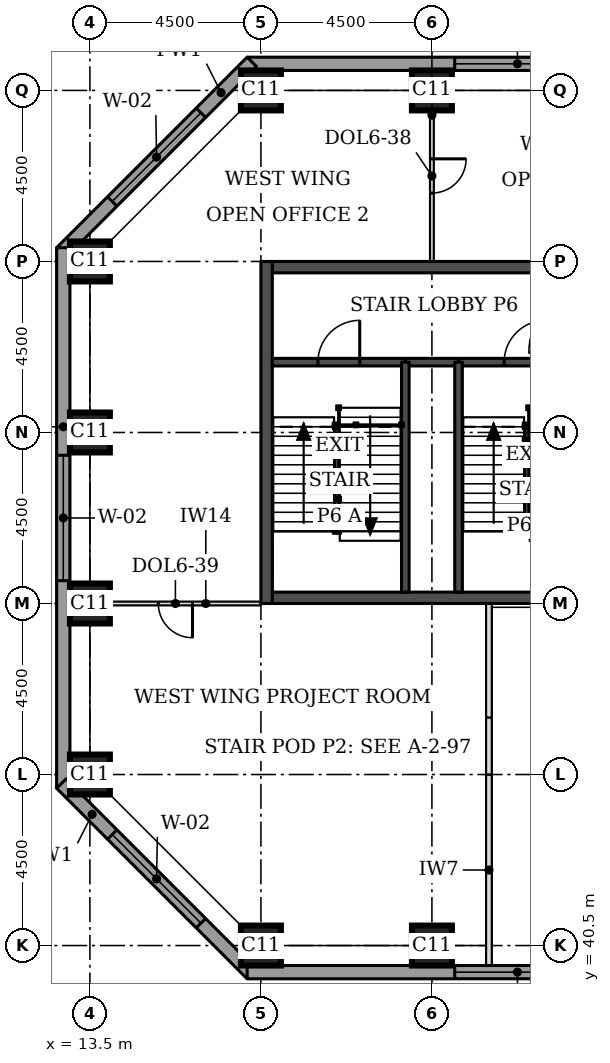
"""IFC4 building model, lengths in metres.
Left out: names, types, materials, properties, quantities, classifications, styles, units other than length and angle.
Written with IfcOpenShell. Run it as: python <this file> out.ifc"""

import sys

from ifc_helpers import new_model, si_unit, direction, frame, frame_2d, origin, origin_2d, place, context, subcontext, project, spatial, rectangle, extrude, element, fill, save


model = new_model("IFC4")
c1 = context("Model", 3, precision=1e-05, world=origin(), true_north=direction((0.0, 1.0)))
c2 = subcontext(c1, "Body", "Model", "MODEL_VIEW")
j1 = project(units=[si_unit("LENGTHUNIT", "METRE"), si_unit("PLANEANGLEUNIT", "RADIAN")], contexts=[c1])
p1 = place(None, origin())
s1 = spatial("IfcSite", under=j1, at=p1, CompositionType="ELEMENT")
p2 = place(p1, origin())
s2 = spatial("IfcBuilding", under=s1, at=p2, CompositionType="ELEMENT")
p3 = place(p2, frame((0.0, 0.0, 119.6)))
s3 = spatial("IfcBuildingStorey", under=s2, at=p3, CompositionType="ELEMENT", Elevation=119.6)
for number, where, z_axis, x_axis in (
    (1, (18.0, 40.5, 0.0), (0.0, 0.0, 1.0), (1.0, 0.0, 0.0)),
    (2, (22.5, 40.5, 0.0), (0.0, 0.0, 1.0), (1.0, 0.0, 0.0)),
    (3, (13.5, 45.0, 0.0), (0.0, 0.0, 1.0), (1.0, 0.0, 0.0)),
    (4, (13.5, 49.5, 0.0), (0.0, 0.0, 1.0), (1.0, 0.0, 0.0)),
    (5, (13.5, 54.0, 0.0), (0.0, 0.0, 1.0), (1.0, 0.0, 0.0)),
    (6, (13.5, 58.5, 0.0), (0.0, 0.0, 1.0), (1.0, 0.0, 0.0)),
    (7, (18.0, 63.0, 0.0), (0.0, 0.0, 1.0), (1.0, 0.0, 0.0)),
    (8, (22.5, 63.0, 0.0), (0.0, 0.0, 1.0), (1.0, 0.0, 0.0)),
):
    element("IfcColumn", number, at=place(p3, frame(where, z_axis=z_axis, x_axis=x_axis)), inside=s3, PredefinedType="COLUMN", context=c2, shape_type="SweptSolid", body=[
        extrude(rectangle(XDim=1.05, YDim=1.05, at=origin_2d()), origin(), (0.0, 0.0, 1.0), 3.7),
    ])
for number, where, z_axis, x_axis in (
    (9, (18.3, 49.65, 0.0), (0.0, 0.0, 1.0), (1.0, 0.0, 0.0)),
    (10, (18.3, 58.35, 0.0), (0.0, 0.0, 1.0), (1.0, 0.0, 0.0)),
):
    element("IfcWall", number, at=place(p3, frame(where, z_axis=z_axis, x_axis=x_axis)), inside=s3, PredefinedType="SHEAR", context=c2, shape_type="SweptSolid", body=[
        extrude(rectangle(XDim=8.4, YDim=0.3, at=frame_2d((4.2, 0.0))), origin(), (0.0, 0.0, 1.0), 3.7),
    ])
p4 = place(p3, frame((18.15, 49.5, 0.0), z_axis=(0.0, 0.0, 1.0), x_axis=(0.0, 1.0, 0.0)))
e11 = element("IfcWall", 11, at=p4, inside=s3, PredefinedType="SHEAR", context=c2, shape_type="SweptSolid", body=[
    extrude(rectangle(XDim=9.0, YDim=0.3, at=frame_2d((4.5, 0.0))), origin(), (0.0, 0.0, 1.0), 3.7),
])
p5 = place(p3, frame((35.475, 63.7, 0.0), z_axis=(0.0, 0.0, 1.0), x_axis=(-1.0, 0.0, 0.0)))
e12 = element("IfcWall", 12, at=p5, inside=s3, PredefinedType="STANDARD", context=c2, shape_type="SweptSolid", body=[
    extrude(rectangle(XDim=17.837, YDim=0.35, at=frame_2d((8.919, 0.0))), origin(), (0.0, 0.0, 1.0), 3.525),
])
p6 = place(p5, frame((0.5, 0.0, 0.9)))
e13 = element("IfcOpeningElement", 13, at=p6, cuts=e12, PredefinedType="OPENING", context=c2, shape_type="SweptSolid", body=[
    extrude(rectangle(XDim=3.3, YDim=1.9, at=frame_2d((1.65, 0.95))), frame((0.0, 0.185, 0.0), z_axis=(0.0, -1.0, 0.0), x_axis=(1.0, 0.0, 0.0)), (0.0, 0.0, 1.0), 0.37),
])
p7 = place(p5, frame((9.075, 0.0, 0.9)))
e14 = element("IfcOpeningElement", 14, at=p7, cuts=e12, PredefinedType="OPENING", context=c2, shape_type="SweptSolid", body=[
    extrude(rectangle(XDim=3.3, YDim=1.9, at=frame_2d((1.65, 0.95))), frame((0.0, 0.185, 0.0), z_axis=(0.0, -1.0, 0.0), x_axis=(1.0, 0.0, 0.0)), (0.0, 0.0, 1.0), 0.37),
])
p8 = place(p3, frame((17.761, 63.751, 0.0), z_axis=(0.0, 0.0, 1.0), x_axis=(-0.707106781187, -0.707106781187, 0.0)))
e15 = element("IfcWall", 15, at=p8, inside=s3, PredefinedType="STANDARD", context=c2, shape_type="SweptSolid", body=[
    extrude(rectangle(XDim=7.089, YDim=0.35, at=frame_2d((3.544, 0.0))), origin(), (0.0, 0.0, 1.0), 3.525),
])
p9 = place(p8, frame((1.894, 0.0, 0.9)))
e16 = element("IfcOpeningElement", 16, at=p9, cuts=e15, PredefinedType="OPENING", context=c2, shape_type="SweptSolid", body=[
    extrude(rectangle(XDim=3.3, YDim=1.9, at=frame_2d((1.65, 0.95))), frame((0.0, 0.185, 0.0), z_axis=(0.0, -1.0, 0.0), x_axis=(1.0, 0.0, 0.0)), (0.0, 0.0, 1.0), 0.37),
])
p10 = place(p3, frame((12.8, 58.862, 0.0), z_axis=(0.0, 0.0, 1.0), x_axis=(0.0, -1.0, 0.0)))
e17 = element("IfcWall", 17, at=p10, inside=s3, PredefinedType="STANDARD", context=c2, shape_type="SweptSolid", body=[
    extrude(rectangle(XDim=14.225, YDim=0.35, at=frame_2d((7.112, 0.0))), origin(), (0.0, 0.0, 1.0), 3.525),
])
p11 = place(p10, frame((5.462, 0.0, 0.9)))
e18 = element("IfcOpeningElement", 18, at=p11, cuts=e17, PredefinedType="OPENING", context=c2, shape_type="SweptSolid", body=[
    extrude(rectangle(XDim=3.3, YDim=1.9, at=frame_2d((1.65, 0.95))), frame((0.0, 0.185, 0.0), z_axis=(0.0, -1.0, 0.0), x_axis=(1.0, 0.0, 0.0)), (0.0, 0.0, 1.0), 0.37),
])
p12 = place(p3, frame((12.749, 44.761, 0.0), z_axis=(0.0, 0.0, 1.0), x_axis=(0.707106781187, -0.707106781187, 0.0)))
e19 = element("IfcWall", 19, at=p12, inside=s3, PredefinedType="STANDARD", context=c2, shape_type="SweptSolid", body=[
    extrude(rectangle(XDim=7.089, YDim=0.35, at=frame_2d((3.544, 0.0))), origin(), (0.0, 0.0, 1.0), 3.525),
])
p13 = place(p12, frame((1.894, 0.0, 0.9)))
e20 = element("IfcOpeningElement", 20, at=p13, cuts=e19, PredefinedType="OPENING", context=c2, shape_type="SweptSolid", body=[
    extrude(rectangle(XDim=3.3, YDim=1.9, at=frame_2d((1.65, 0.95))), frame((0.0, 0.185, 0.0), z_axis=(0.0, -1.0, 0.0), x_axis=(1.0, 0.0, 0.0)), (0.0, 0.0, 1.0), 0.37),
])
p14 = place(p3, frame((17.638, 39.8, 0.0), z_axis=(0.0, 0.0, 1.0), x_axis=(1.0, 0.0, 0.0)))
e21 = element("IfcWall", 21, at=p14, inside=s3, PredefinedType="STANDARD", context=c2, shape_type="SweptSolid", body=[
    extrude(rectangle(XDim=17.837, YDim=0.35, at=frame_2d((8.919, 0.0))), origin(), (0.0, 0.0, 1.0), 3.525),
])
p15 = place(p14, frame((5.462, 0.0, 0.9)))
e22 = element("IfcOpeningElement", 22, at=p15, cuts=e21, PredefinedType="OPENING", context=c2, shape_type="SweptSolid", body=[
    extrude(rectangle(XDim=3.3, YDim=1.9, at=frame_2d((1.65, 0.95))), frame((0.0, 0.185, 0.0), z_axis=(0.0, -1.0, 0.0), x_axis=(1.0, 0.0, 0.0)), (0.0, 0.0, 1.0), 0.37),
])
p16 = place(p14, frame((14.037, 0.0, 0.9)))
e23 = element("IfcOpeningElement", 23, at=p16, cuts=e21, PredefinedType="OPENING", context=c2, shape_type="SweptSolid", body=[
    extrude(rectangle(XDim=3.3, YDim=1.9, at=frame_2d((1.65, 0.95))), frame((0.0, 0.185, 0.0), z_axis=(0.0, -1.0, 0.0), x_axis=(1.0, 0.0, 0.0)), (0.0, 0.0, 1.0), 0.37),
])
p17 = place(p3, frame((24.0, 39.975, 0.0), z_axis=(0.0, 0.0, 1.0), x_axis=(0.0, 1.0, 0.0)))
e24 = element("IfcWall", 24, at=p17, inside=s3, PredefinedType="PARTITIONING", context=c2, shape_type="SweptSolid", body=[
    extrude(rectangle(XDim=5.025, YDim=0.15, at=frame_2d((2.512, 0.0))), origin(), (0.0, 0.0, 1.0), 3.55),
])
p18 = place(p3, frame((24.0, 45.0, 0.0), z_axis=(0.0, 0.0, 1.0), x_axis=(0.0, 1.0, 0.0)))
e25 = element("IfcWall", 25, at=p18, inside=s3, PredefinedType="PARTITIONING", context=c2, shape_type="SweptSolid", body=[
    extrude(rectangle(XDim=1.5, YDim=0.15, at=frame_2d((0.75, 0.0))), origin(), (0.0, 0.0, 1.0), 3.55),
])
p19 = place(p3, frame((24.0, 46.5, 0.0), z_axis=(0.0, 0.0, 1.0), x_axis=(0.0, 1.0, 0.0)))
e26 = element("IfcWall", 26, at=p19, inside=s3, PredefinedType="PARTITIONING", context=c2, shape_type="SweptSolid", body=[
    extrude(rectangle(XDim=3.0, YDim=0.15, at=frame_2d((1.5, 0.0))), origin(), (0.0, 0.0, 1.0), 3.55),
])
p20 = place(p3, frame((22.5, 63.0, 0.0), z_axis=(0.0, 0.0, 1.0), x_axis=(0.0, -1.0, 0.0)))
e27 = element("IfcWall", 27, at=p20, inside=s3, PredefinedType="PARTITIONING", context=c2, shape_type="SweptSolid", body=[
    extrude(rectangle(XDim=4.5, YDim=0.1, at=frame_2d((2.25, 0.0))), origin(), (0.0, 0.0, 1.0), 3.55),
])
p21 = place(p20, frame((1.8, 0.0, 0.0)))
e28 = element("IfcOpeningElement", 28, at=p21, cuts=e27, PredefinedType="OPENING", context=c2, shape_type="SweptSolid", body=[
    extrude(rectangle(XDim=0.9, YDim=2.1, at=frame_2d((0.45, 1.05))), frame((0.0, 0.06, 0.0), z_axis=(0.0, -1.0, 0.0), x_axis=(1.0, 0.0, 0.0)), (0.0, 0.0, 1.0), 0.12),
])
p22 = place(p3, frame((13.5, 49.5, 0.0), z_axis=(0.0, 0.0, 1.0), x_axis=(1.0, 0.0, 0.0)))
e29 = element("IfcWall", 29, at=p22, inside=s3, PredefinedType="PARTITIONING", context=c2, shape_type="SweptSolid", body=[
    extrude(rectangle(XDim=4.5, YDim=0.1, at=frame_2d((2.25, 0.0))), origin(), (0.0, 0.0, 1.0), 3.55),
])
p23 = place(p22, frame((1.8, 0.0, 0.0)))
e30 = element("IfcOpeningElement", 30, at=p23, cuts=e29, PredefinedType="OPENING", context=c2, shape_type="SweptSolid", body=[
    extrude(rectangle(XDim=0.9, YDim=2.1, at=frame_2d((0.45, 1.05))), frame((0.0, 0.06, 0.0), z_axis=(0.0, -1.0, 0.0), x_axis=(1.0, 0.0, 0.0)), (0.0, 0.0, 1.0), 0.12),
])
p24 = place(p3, frame((21.8, 55.85, 0.0), z_axis=(0.0, 0.0, 1.0), x_axis=(1.0, 0.0, 0.0)))
e31 = element("IfcWall", 31, at=p24, inside=s3, PredefinedType="SOLIDWALL", context=c2, shape_type="SweptSolid", body=[
    extrude(rectangle(XDim=1.4, YDim=0.2, at=frame_2d((0.7, 0.0))), origin(), (0.0, 0.0, 1.0), 3.55),
])
p25 = place(p3, frame((18.3, 55.85, 0.0), z_axis=(0.0, 0.0, 1.0), x_axis=(1.0, 0.0, 0.0)))
e32 = element("IfcWall", 32, at=p25, inside=s3, PredefinedType="SOLIDWALL", context=c2, shape_type="SweptSolid", body=[
    extrude(rectangle(XDim=3.5, YDim=0.2, at=frame_2d((1.75, 0.0))), origin(), (0.0, 0.0, 1.0), 3.55),
])
p26 = place(p25, frame((1.2, 0.0, 0.0)))
e33 = element("IfcOpeningElement", 33, at=p26, cuts=e32, PredefinedType="OPENING", context=c2, shape_type="SweptSolid", body=[
    extrude(rectangle(XDim=1.1, YDim=2.1, at=frame_2d((0.55, 1.05))), frame((0.0, 0.11, 0.0), z_axis=(0.0, -1.0, 0.0), x_axis=(1.0, 0.0, 0.0)), (0.0, 0.0, 1.0), 0.22),
])
p27 = place(p3, frame((23.2, 55.85, 0.0), z_axis=(0.0, 0.0, 1.0), x_axis=(1.0, 0.0, 0.0)))
e34 = element("IfcWall", 34, at=p27, inside=s3, PredefinedType="SOLIDWALL", context=c2, shape_type="SweptSolid", body=[
    extrude(rectangle(XDim=3.5, YDim=0.2, at=frame_2d((1.75, 0.0))), origin(), (0.0, 0.0, 1.0), 3.55),
])
p28 = place(p27, frame((1.2, 0.0, 0.0)))
e35 = element("IfcOpeningElement", 35, at=p28, cuts=e34, PredefinedType="OPENING", context=c2, shape_type="SweptSolid", body=[
    extrude(rectangle(XDim=1.1, YDim=2.1, at=frame_2d((0.55, 1.05))), frame((0.0, 0.11, 0.0), z_axis=(0.0, -1.0, 0.0), x_axis=(1.0, 0.0, 0.0)), (0.0, 0.0, 1.0), 0.22),
])
for number, where, z_axis, x_axis in (
    (36, (21.8, 49.8, 0.0), (0.0, 0.0, 1.0), (0.0, 1.0, 0.0)),
    (37, (23.2, 49.8, 0.0), (0.0, 0.0, 1.0), (0.0, 1.0, 0.0)),
):
    element("IfcWall", number, at=place(p3, frame(where, z_axis=z_axis, x_axis=x_axis)), inside=s3, PredefinedType="SOLIDWALL", context=c2, shape_type="SweptSolid", body=[
        extrude(rectangle(XDim=6.05, YDim=0.2, at=frame_2d((3.025, 0.0))), origin(), (0.0, 0.0, 1.0), 3.55),
    ])
p29 = place(p7, origin())
e38 = element("IfcWindow", 38, at=p29, inside=s3, PartitioningType="SINGLE_PANEL", PredefinedType="WINDOW", context=c2, shape_type="SweptSolid", body=[
    extrude(rectangle(XDim=3.3, YDim=1.9, at=frame_2d((1.65, 0.95))), frame((0.0, 0.085, 0.0), z_axis=(0.0, -1.0, 0.0), x_axis=(1.0, 0.0, 0.0)), (0.0, 0.0, 1.0), 0.06),
])
fill(e14, e38)
p30 = place(p9, origin())
e39 = element("IfcWindow", 39, at=p30, inside=s3, PartitioningType="SINGLE_PANEL", PredefinedType="WINDOW", context=c2, shape_type="SweptSolid", body=[
    extrude(rectangle(XDim=3.3, YDim=1.9, at=frame_2d((1.65, 0.95))), frame((0.0, 0.085, 0.0), z_axis=(0.0, -1.0, 0.0), x_axis=(1.0, 0.0, 0.0)), (0.0, 0.0, 1.0), 0.06),
])
fill(e16, e39)
p31 = place(p11, origin())
e40 = element("IfcWindow", 40, at=p31, inside=s3, PartitioningType="SINGLE_PANEL", PredefinedType="WINDOW", context=c2, shape_type="SweptSolid", body=[
    extrude(rectangle(XDim=3.3, YDim=1.9, at=frame_2d((1.65, 0.95))), frame((0.0, 0.085, 0.0), z_axis=(0.0, -1.0, 0.0), x_axis=(1.0, 0.0, 0.0)), (0.0, 0.0, 1.0), 0.06),
])
fill(e18, e40)
p32 = place(p13, origin())
e41 = element("IfcWindow", 41, at=p32, inside=s3, PartitioningType="SINGLE_PANEL", PredefinedType="WINDOW", context=c2, shape_type="SweptSolid", body=[
    extrude(rectangle(XDim=3.3, YDim=1.9, at=frame_2d((1.65, 0.95))), frame((0.0, 0.085, 0.0), z_axis=(0.0, -1.0, 0.0), x_axis=(1.0, 0.0, 0.0)), (0.0, 0.0, 1.0), 0.06),
])
fill(e20, e41)
p33 = place(p15, origin())
e42 = element("IfcWindow", 42, at=p33, inside=s3, PartitioningType="SINGLE_PANEL", PredefinedType="WINDOW", context=c2, shape_type="SweptSolid", body=[
    extrude(rectangle(XDim=3.3, YDim=1.9, at=frame_2d((1.65, 0.95))), frame((0.0, 0.085, 0.0), z_axis=(0.0, -1.0, 0.0), x_axis=(1.0, 0.0, 0.0)), (0.0, 0.0, 1.0), 0.06),
])
fill(e22, e42)
p34 = place(p21, origin())
e43 = element("IfcDoor", 43, at=p34, inside=s3, OperationType="SINGLE_SWING_LEFT", PredefinedType="DOOR", context=c2, shape_type="SweptSolid", body=[
    extrude(rectangle(XDim=0.9, YDim=2.1, at=frame_2d((0.45, 1.05))), frame((0.0, 0.025, 0.0), z_axis=(0.0, -1.0, 0.0), x_axis=(1.0, 0.0, 0.0)), (0.0, 0.0, 1.0), 0.05),
])
fill(e28, e43)
p35 = place(p23, frame((0.9, 0.0, 0.0), z_axis=(0.0, 0.0, 1.0), x_axis=(-1.0, 0.0, 0.0)))
e44 = element("IfcDoor", 44, at=p35, inside=s3, OperationType="SINGLE_SWING_LEFT", PredefinedType="DOOR", context=c2, shape_type="SweptSolid", body=[
    extrude(rectangle(XDim=0.9, YDim=2.1, at=frame_2d((0.45, 1.05))), frame((0.0, 0.025, 0.0), z_axis=(0.0, -1.0, 0.0), x_axis=(1.0, 0.0, 0.0)), (0.0, 0.0, 1.0), 0.05),
])
fill(e30, e44)
p36 = place(p26, origin())
e45 = element("IfcDoor", 45, at=p36, inside=s3, OperationType="SINGLE_SWING_RIGHT", PredefinedType="DOOR", context=c2, shape_type="SweptSolid", body=[
    extrude(rectangle(XDim=1.1, YDim=2.1, at=frame_2d((0.55, 1.05))), frame((0.0, 0.025, 0.0), z_axis=(0.0, -1.0, 0.0), x_axis=(1.0, 0.0, 0.0)), (0.0, 0.0, 1.0), 0.05),
])
fill(e33, e45)
p37 = place(p28, origin())
e46 = element("IfcDoor", 46, at=p37, inside=s3, OperationType="SINGLE_SWING_RIGHT", PredefinedType="DOOR", context=c2, shape_type="SweptSolid", body=[
    extrude(rectangle(XDim=1.1, YDim=2.1, at=frame_2d((0.55, 1.05))), frame((0.0, 0.025, 0.0), z_axis=(0.0, -1.0, 0.0), x_axis=(1.0, 0.0, 0.0)), (0.0, 0.0, 1.0), 0.05),
])
fill(e35, e46)
save(model, sys.argv[1])
